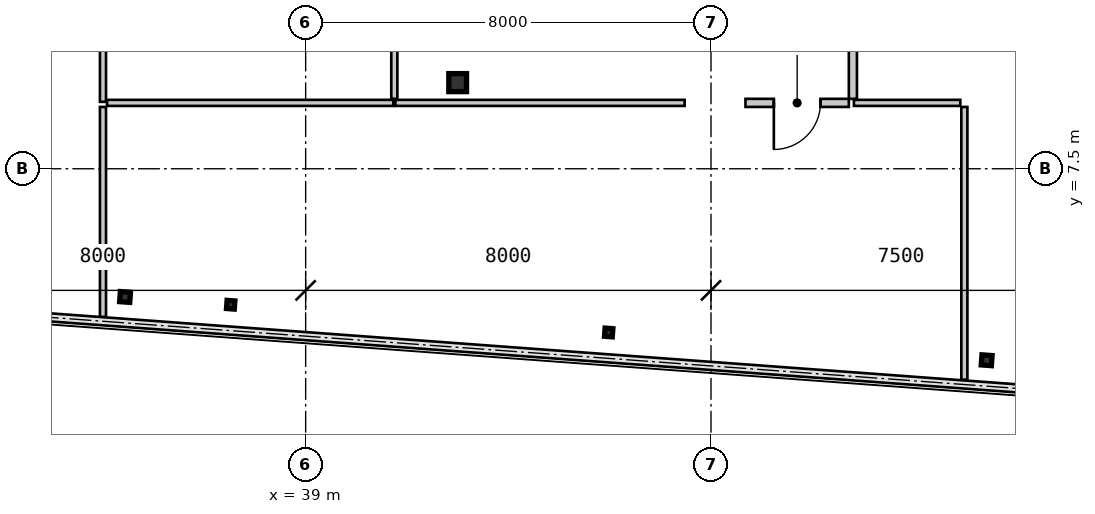
"""IFC4 building model, lengths in metres.
Left out: names, types, materials, properties, quantities, classifications, styles, units other than length and angle.
Written with IfcOpenShell. Run it as: python <this file> out.ifc"""

import sys

from ifc_helpers import new_model, si_unit, direction, frame, frame_2d, origin, origin_2d, place, context, subcontext, project, spatial, rectangle, hollow_rectangle, i_section, extrude, source, transform, mapped, element, fill, save


model = new_model("IFC4")
c1 = context("Model", 3, precision=1e-05, world=origin(), true_north=direction((0.0, 1.0)))
c2 = subcontext(c1, "Body", "Model", "MODEL_VIEW")
j1 = project(units=[si_unit("LENGTHUNIT", "METRE"), si_unit("PLANEANGLEUNIT", "RADIAN")], contexts=[c1])
p1 = place(None, origin())
s1 = spatial("IfcSite", under=j1, at=p1, CompositionType="ELEMENT")
p2 = place(p1, origin())
s2 = spatial("IfcBuilding", under=s1, at=p2, CompositionType="ELEMENT")
p3 = place(p2, frame((0.0, 0.0, 246.05)))
s3 = spatial("IfcBuildingStorey", under=s2, at=p3, CompositionType="ELEMENT", Elevation=246.05)
m1 = source(origin(), c2, "Body", "SweptSolid", [
    extrude(i_section(OverallWidth=0.35, OverallDepth=0.356, WebThickness=0.018, FlangeThickness=0.028, at=origin_2d()), origin(), (0.0, 0.0, 1.0), 3.15),
])
p4 = place(p3, frame((42.0, 9.2, 0.0), z_axis=(0.0, 0.0, 1.0), x_axis=(1.0, 0.0, 0.0)))
e1 = element("IfcColumn", 1, at=p4, inside=s3, PredefinedType="COLUMN", context=c2, shape_type="MappedRepresentation", body=[
    mapped(m1, transform((0.0, 0.0, 0.0), scale=1.0)),
])
m2 = source(origin(), c2, "Body", "SweptSolid", [
    extrude(i_section(OverallWidth=0.154, OverallDepth=0.162, WebThickness=0.008, FlangeThickness=0.011, at=origin_2d()), origin(), (0.0, 0.0, 1.0), 3.15),
])
for number, where, z_axis, x_axis in (
    (2, (37.521, 4.817, 0.0), (0.0, 0.0, 1.0), (0.997, -0.073, 0.0)),
    (3, (44.98, 4.269, 0.0), (0.0, 0.0, 1.0), (0.997, -0.073, 0.0)),
):
    element("IfcColumn", number, at=place(p3, frame(where, z_axis=z_axis, x_axis=x_axis)), inside=s3, PredefinedType="COLUMN", context=c2, shape_type="MappedRepresentation", body=[
        mapped(m2, transform((0.0, 0.0, 0.0), scale=1.0)),
    ])
m3 = source(origin(), c2, "Body", "SweptSolid", [
    extrude(hollow_rectangle(XDim=0.2, YDim=0.2, WallThickness=0.009, at=origin_2d()), origin(), (0.0, 0.0, 1.0), 3.15),
])
for number, where, z_axis, x_axis in (
    (4, (52.44, 3.721, 0.0), (0.0, 0.0, 1.0), (0.997, -0.073, 0.0)),
    (5, (35.436, 4.97, 0.0), (0.0, 0.0, 1.0), (0.997, -0.073, 0.0)),
):
    element("IfcColumn", number, at=place(p3, frame(where, z_axis=z_axis, x_axis=x_axis)), inside=s3, PredefinedType="COLUMN", context=c2, shape_type="MappedRepresentation", body=[
        mapped(m3, transform((0.0, 0.0, 0.0), scale=1.0)),
    ])
m4 = source(origin(), c2, "Body", "SweptSolid", [
    extrude(rectangle(XDim=2.04, YDim=0.16, at=frame_2d((1.02, 0.0))), origin(), (0.0, 0.0, 1.0), 2.93),
])
p5 = place(p3, frame((49.72, 8.8, 0.0), z_axis=(0.0, 0.0, 1.0), x_axis=(-1.0, 0.0, 0.0)))
e6 = element("IfcWall", 6, at=p5, inside=s3, PredefinedType="PARTITIONING", context=c2, shape_type="MappedRepresentation", body=[
    mapped(m4, transform((0.0, 0.0, 0.0), scale=1.0)),
])
m5 = source(origin(), c2, "Body", "SweptSolid", [
    extrude(rectangle(XDim=0.92, YDim=2.1, at=frame_2d((0.46, 1.05))), frame((0.0, 0.09, 0.0), z_axis=(0.0, -1.0, 0.0), x_axis=(1.0, 0.0, 0.0)), (0.0, 0.0, 1.0), 0.18),
])
p6 = place(p5, frame((0.56, 0.0, 0.0)))
e7 = element("IfcOpeningElement", 7, at=p6, cuts=e6, PredefinedType="OPENING", context=c2, shape_type="MappedRepresentation", body=[
    mapped(m5, transform((0.0, 0.0, 0.0), scale=1.0)),
])
m6 = source(origin(), c2, "Body", "SweptSolid", [
    extrude(rectangle(XDim=12.84, YDim=0.16, at=frame_2d((6.42, 0.0))), origin(), (0.0, 0.0, 1.0), 2.93),
])
p7 = place(p3, frame((49.8, 21.72, 0.0), z_axis=(0.0, 0.0, 1.0), x_axis=(0.0, -1.0, 0.0)))
e8 = element("IfcWall", 8, at=p7, inside=s3, PredefinedType="PARTITIONING", context=c2, shape_type="MappedRepresentation", body=[
    mapped(m6, transform((0.0, 0.0, 0.0), scale=1.0)),
])
p8 = place(p7, frame((5.93, 0.0, 0.0)))
e9 = element("IfcOpeningElement", 9, at=p8, cuts=e8, PredefinedType="OPENING", context=c2, shape_type="MappedRepresentation", body=[
    mapped(m5, transform((0.0, 0.0, 0.0), scale=1.0)),
])
m7 = source(origin(), c2, "Body", "SweptSolid", [
    extrude(rectangle(XDim=4.145, YDim=0.12, at=frame_2d((2.073, 0.0))), origin(), (0.0, 0.0, 1.0), 2.93),
])
p9 = place(p3, frame((35.0, 4.575, 0.0), z_axis=(0.0, 0.0, 1.0), x_axis=(0.0, 1.0, 0.0)))
e10 = element("IfcWall", 10, at=p9, inside=s3, PredefinedType="PARTITIONING", context=c2, shape_type="MappedRepresentation", body=[
    mapped(m7, transform((0.0, 0.0, 0.0), scale=1.0)),
])
m8 = source(origin(), c2, "Body", "SweptSolid", [
    extrude(rectangle(XDim=5.65, YDim=0.12, at=frame_2d((2.825, 0.0))), origin(), (0.0, 0.0, 1.0), 2.93),
])
p10 = place(p3, frame((35.08, 8.8, 0.0), z_axis=(0.0, 0.0, 1.0), x_axis=(1.0, 0.0, 0.0)))
e11 = element("IfcWall", 11, at=p10, inside=s3, PredefinedType="PARTITIONING", context=c2, shape_type="MappedRepresentation", body=[
    mapped(m8, transform((0.0, 0.0, 0.0), scale=1.0)),
])
m9 = source(origin(), c2, "Body", "SweptSolid", [
    extrude(rectangle(XDim=5.709, YDim=0.12, at=frame_2d((2.855, 0.0))), origin(), (0.0, 0.0, 1.0), 2.93),
])
p11 = place(p3, frame((40.77, 8.8, 0.0), z_axis=(0.0, 0.0, 1.0), x_axis=(1.0, 0.0, 0.0)))
e12 = element("IfcWall", 12, at=p11, inside=s3, PredefinedType="PARTITIONING", context=c2, shape_type="MappedRepresentation", body=[
    mapped(m9, transform((0.0, 0.0, 0.0), scale=1.0)),
])
m10 = source(origin(), c2, "Body", "SweptSolid", [
    extrude(rectangle(XDim=5.382, YDim=0.12, at=frame_2d((2.691, 0.0))), origin(), (0.0, 0.0, 1.0), 2.93),
])
p12 = place(p3, frame((52.0, 8.72, 0.0), z_axis=(0.0, 0.0, 1.0), x_axis=(0.0, -1.0, 0.0)))
e13 = element("IfcWall", 13, at=p12, inside=s3, PredefinedType="PARTITIONING", context=c2, shape_type="MappedRepresentation", body=[
    mapped(m10, transform((0.0, 0.0, 0.0), scale=1.0)),
])
m11 = source(origin(), c2, "Body", "SweptSolid", [
    extrude(rectangle(XDim=2.1, YDim=0.12, at=frame_2d((1.05, 0.0))), origin(), (0.0, 0.0, 1.0), 2.93),
])
p13 = place(p3, frame((49.82, 8.8, 0.0), z_axis=(0.0, 0.0, 1.0), x_axis=(1.0, 0.0, 0.0)))
e14 = element("IfcWall", 14, at=p13, inside=s3, PredefinedType="PARTITIONING", context=c2, shape_type="MappedRepresentation", body=[
    mapped(m11, transform((0.0, 0.0, 0.0), scale=1.0)),
])
m12 = source(origin(), c2, "Body", "SweptSolid", [
    extrude(rectangle(XDim=12.9, YDim=0.12, at=frame_2d((6.45, 0.0))), origin(), (0.0, 0.0, 1.0), 2.93),
])
p14 = place(p3, frame((35.0, 21.72, 0.0), z_axis=(0.0, 0.0, 1.0), x_axis=(0.0, -1.0, 0.0)))
e15 = element("IfcWall", 15, at=p14, inside=s3, PredefinedType="PARTITIONING", context=c2, shape_type="MappedRepresentation", body=[
    mapped(m12, transform((0.0, 0.0, 0.0), scale=1.0)),
])
m13 = source(origin(), c2, "Body", "SweptSolid", [
    extrude(rectangle(XDim=5.997, YDim=0.12, at=frame_2d((2.999, 0.0))), origin(), (0.0, 0.0, 1.0), 2.93),
])
p15 = place(p3, frame((40.75, 14.877, 0.0), z_axis=(0.0, 0.0, 1.0), x_axis=(0.0, -1.0, 0.0)))
e16 = element("IfcWall", 16, at=p15, inside=s3, PredefinedType="PARTITIONING", context=c2, shape_type="MappedRepresentation", body=[
    mapped(m13, transform((0.0, 0.0, 0.0), scale=1.0)),
])
m14 = source(origin(), c2, "Body", "SweptSolid", [
    extrude(rectangle(XDim=0.92, YDim=2.1, at=frame_2d((0.46, 1.05))), frame((0.0, 0.025, 0.0), z_axis=(0.0, -1.0, 0.0), x_axis=(1.0, 0.0, 0.0)), (0.0, 0.0, 1.0), 0.05),
])
p16 = place(p6, origin())
e17 = element("IfcDoor", 17, at=p16, inside=s3, OperationType="SINGLE_SWING_RIGHT", PredefinedType="DOOR", context=c2, shape_type="MappedRepresentation", body=[
    mapped(m14, transform((0.0, 0.0, 0.0), scale=1.0)),
])
fill(e7, e17)
save(model, sys.argv[1])
